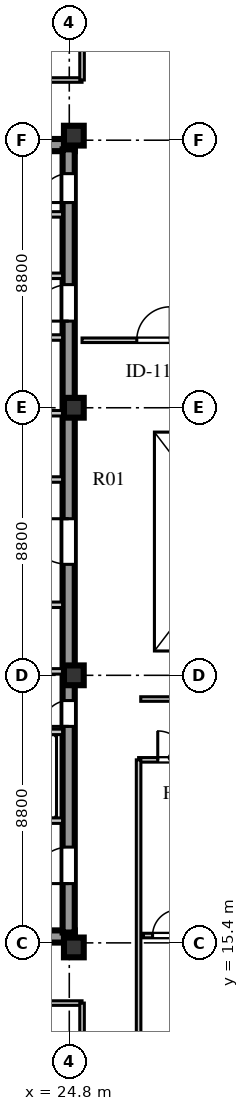
"""IFC4 building model, lengths in metres.
Left out: names, types, materials, properties, quantities, classifications, styles, units other than length and angle.
Written with IfcOpenShell. Run it as: python <this file> out.ifc"""

import sys

from ifc_helpers import new_model, si_unit, direction, frame, frame_2d, origin, origin_2d, place, context, subcontext, project, spatial, rectangle, extrude, element, fill, save


model = new_model("IFC4")
c1 = context("Model", 3, precision=1e-05, world=origin(), true_north=direction((0.0, 1.0)))
c2 = subcontext(c1, "Body", "Model", "MODEL_VIEW")
j1 = project(units=[si_unit("LENGTHUNIT", "METRE"), si_unit("PLANEANGLEUNIT", "RADIAN")], contexts=[c1])
p1 = place(None, origin())
s1 = spatial("IfcSite", under=j1, at=p1, CompositionType="ELEMENT")
p2 = place(p1, origin())
s2 = spatial("IfcBuilding", under=s1, at=p2, CompositionType="ELEMENT")
p3 = place(p2, frame((0.0, 0.0, 320.1)))
s3 = spatial("IfcBuildingStorey", under=s2, at=p3, CompositionType="ELEMENT", Elevation=320.1)
for number, where, z_axis, x_axis in (
    (1, (15.5, 15.61, 0.0), (0.0, 0.0, 1.0), (1.0, 0.0, 0.0)),
    (2, (15.5, 41.64, 0.0), (0.0, 0.0, 1.0), (1.0, 0.0, 0.0)),
):
    element("IfcWall", number, at=place(p3, frame(where, z_axis=z_axis, x_axis=x_axis)), inside=s3, PredefinedType="SHEAR", context=c2, shape_type="SweptSolid", body=[
        extrude(rectangle(XDim=9.48, YDim=0.4, at=frame_2d((4.74, 0.0))), origin(), (0.0, 0.0, 1.0), 3.56),
    ])
p4 = place(p3, frame((24.78, 15.74, 0.0), z_axis=(0.0, 0.0, 1.0), x_axis=(0.0, 1.0, 0.0)))
e3 = element("IfcWall", 3, at=p4, inside=s3, PredefinedType="SHEAR", context=c2, shape_type="SweptSolid", body=[
    extrude(rectangle(XDim=25.76, YDim=0.4, at=frame_2d((12.88, 0.0))), origin(), (0.0, 0.0, 1.0), 3.56),
])
p5 = place(p4, frame((1.61, 0.0, 0.0)))
e4 = element("IfcOpeningElement", 4, at=p5, cuts=e3, PredefinedType="OPENING", context=c2, shape_type="SweptSolid", body=[
    extrude(rectangle(XDim=1.2, YDim=2.1, at=frame_2d((0.6, 1.05))), frame((0.0, 0.21, 0.0), z_axis=(0.0, -1.0, 0.0), x_axis=(1.0, 0.0, 0.0)), (0.0, 0.0, 1.0), 0.42),
])
p6 = place(p4, frame((6.78, 0.0, 0.0)))
e5 = element("IfcOpeningElement", 5, at=p6, cuts=e3, PredefinedType="OPENING", context=c2, shape_type="SweptSolid", body=[
    extrude(rectangle(XDim=0.85, YDim=2.06, at=frame_2d((0.425, 1.03))), frame((0.0, 0.21, 0.0), z_axis=(0.0, -1.0, 0.0), x_axis=(1.0, 0.0, 0.0)), (0.0, 0.0, 1.0), 0.42),
])
p7 = place(p4, frame((12.11, 0.0, 0.0)))
e6 = element("IfcOpeningElement", 6, at=p7, cuts=e3, PredefinedType="OPENING", context=c2, shape_type="SweptSolid", body=[
    extrude(rectangle(XDim=1.5, YDim=2.12, at=frame_2d((0.75, 1.06))), frame((0.0, 0.21, 0.0), z_axis=(0.0, -1.0, 0.0), x_axis=(1.0, 0.0, 0.0)), (0.0, 0.0, 1.0), 0.42),
])
p8 = place(p4, frame((20.11, 0.0, 0.0)))
e7 = element("IfcOpeningElement", 7, at=p8, cuts=e3, PredefinedType="OPENING", context=c2, shape_type="SweptSolid", body=[
    extrude(rectangle(XDim=1.2, YDim=2.12, at=frame_2d((0.6, 1.06))), frame((0.0, 0.21, 0.0), z_axis=(0.0, -1.0, 0.0), x_axis=(1.0, 0.0, 0.0)), (0.0, 0.0, 1.0), 0.42),
])
p9 = place(p4, frame((24.01, 0.0, 0.0)))
e8 = element("IfcOpeningElement", 8, at=p9, cuts=e3, PredefinedType="OPENING", context=c2, shape_type="SweptSolid", body=[
    extrude(rectangle(XDim=0.95, YDim=2.1, at=frame_2d((0.475, 1.05))), frame((0.0, 0.21, 0.0), z_axis=(0.0, -1.0, 0.0), x_axis=(1.0, 0.0, 0.0)), (0.0, 0.0, 1.0), 0.42),
])
for number, where, z_axis, x_axis in (
    (9, (24.95, 15.25, 0.0), (0.0, 0.0, 1.0), (1.0, 0.0, 0.0)),
    (10, (24.95, 24.2, 0.0), (0.0, 0.0, 1.0), (1.0, 0.0, 0.0)),
    (11, (24.95, 33.0, 0.0), (0.0, 0.0, 1.0), (1.0, 0.0, 0.0)),
    (12, (24.95, 41.95, 0.0), (0.0, 0.0, 1.0), (1.0, 0.0, 0.0)),
):
    element("IfcColumn", number, at=place(p3, frame(where, z_axis=z_axis, x_axis=x_axis)), inside=s3, PredefinedType="COLUMN", context=c2, shape_type="SweptSolid", body=[
        extrude(rectangle(XDim=0.65, YDim=0.65, at=origin_2d()), origin(), (0.0, 0.0, 1.0), 3.56),
    ])
p10 = place(p3, frame((19.64, 19.42, 0.0), z_axis=(0.0, 0.0, 1.0), x_axis=(1.0, 0.0, 0.0)))
e13 = element("IfcWall", 13, at=p10, inside=s3, PredefinedType="SOLIDWALL", context=c2, shape_type="SweptSolid", body=[
    extrude(rectangle(XDim=4.94, YDim=0.18, at=frame_2d((2.47, 0.0))), origin(), (0.0, 0.0, 1.0), 3.56),
])
p11 = place(p10, frame((0.72, 0.0, 0.0)))
e14 = element("IfcOpeningElement", 14, at=p11, cuts=e13, PredefinedType="OPENING", context=c2, shape_type="SweptSolid", body=[
    extrude(rectangle(XDim=1.1, YDim=2.1, at=frame_2d((0.55, 1.05))), frame((0.0, 0.1, 0.0), z_axis=(0.0, -1.0, 0.0), x_axis=(1.0, 0.0, 0.0)), (0.0, 0.0, 1.0), 0.2),
])
p12 = place(p10, frame((3.02, 0.0, 0.0)))
e15 = element("IfcOpeningElement", 15, at=p12, cuts=e13, PredefinedType="OPENING", context=c2, shape_type="SweptSolid", body=[
    extrude(rectangle(XDim=1.1, YDim=2.1, at=frame_2d((0.55, 1.05))), frame((0.0, 0.1, 0.0), z_axis=(0.0, -1.0, 0.0), x_axis=(1.0, 0.0, 0.0)), (0.0, 0.0, 1.0), 0.2),
])
p13 = place(p3, frame((19.64, 22.34, 0.0), z_axis=(0.0, 0.0, 1.0), x_axis=(1.0, 0.0, 0.0)))
e16 = element("IfcWall", 16, at=p13, inside=s3, PredefinedType="SOLIDWALL", context=c2, shape_type="SweptSolid", body=[
    extrude(rectangle(XDim=4.94, YDim=0.18, at=frame_2d((2.47, 0.0))), origin(), (0.0, 0.0, 1.0), 3.56),
])
p14 = place(p3, frame((15.9, 26.52, 0.0), z_axis=(0.0, 0.0, 1.0), x_axis=(1.0, 0.0, 0.0)))
e17 = element("IfcWall", 17, at=p14, inside=s3, PredefinedType="SOLIDWALL", context=c2, shape_type="SweptSolid", body=[
    extrude(rectangle(XDim=8.68, YDim=0.18, at=frame_2d((4.34, 0.0))), origin(), (0.0, 0.0, 1.0), 3.56),
])
p15 = place(p14, frame((2.5, 0.0, 0.0)))
e18 = element("IfcOpeningElement", 18, at=p15, cuts=e17, PredefinedType="OPENING", context=c2, shape_type="SweptSolid", body=[
    extrude(rectangle(XDim=0.95, YDim=2.1, at=frame_2d((0.475, 1.05))), frame((0.0, 0.1, 0.0), z_axis=(0.0, -1.0, 0.0), x_axis=(1.0, 0.0, 0.0)), (0.0, 0.0, 1.0), 0.2),
])
p16 = place(p14, frame((6.0, 0.0, 0.0)))
e19 = element("IfcOpeningElement", 19, at=p16, cuts=e17, PredefinedType="OPENING", context=c2, shape_type="SweptSolid", body=[
    extrude(rectangle(XDim=0.95, YDim=2.1, at=frame_2d((0.475, 1.05))), frame((0.0, 0.1, 0.0), z_axis=(0.0, -1.0, 0.0), x_axis=(1.0, 0.0, 0.0)), (0.0, 0.0, 1.0), 0.2),
])
p17 = place(p3, frame((15.9, 24.33, 0.0), z_axis=(0.0, 0.0, 1.0), x_axis=(1.0, 0.0, 0.0)))
e20 = element("IfcWall", 20, at=p17, inside=s3, PredefinedType="SOLIDWALL", context=c2, shape_type="SweptSolid", body=[
    extrude(rectangle(XDim=8.68, YDim=0.18, at=frame_2d((4.34, 0.0))), origin(), (0.0, 0.0, 1.0), 2.96),
])
p18 = place(p3, frame((15.9, 30.64, 0.0), z_axis=(0.0, 0.0, 1.0), x_axis=(1.0, 0.0, 0.0)))
e21 = element("IfcWall", 21, at=p18, inside=s3, PredefinedType="SOLIDWALL", context=c2, shape_type="SweptSolid", body=[
    extrude(rectangle(XDim=8.68, YDim=0.18, at=frame_2d((4.34, 0.0))), origin(), (0.0, 0.0, 1.0), 3.56),
])
p19 = place(p18, frame((3.7, 0.0, 0.0)))
e22 = element("IfcOpeningElement", 22, at=p19, cuts=e21, PredefinedType="OPENING", context=c2, shape_type="SweptSolid", body=[
    extrude(rectangle(XDim=0.95, YDim=2.1, at=frame_2d((0.475, 1.05))), frame((0.0, 0.1, 0.0), z_axis=(0.0, -1.0, 0.0), x_axis=(1.0, 0.0, 0.0)), (0.0, 0.0, 1.0), 0.2),
])
p20 = place(p3, frame((15.9, 32.82, 0.0), z_axis=(0.0, 0.0, 1.0), x_axis=(1.0, 0.0, 0.0)))
e23 = element("IfcWall", 23, at=p20, inside=s3, PredefinedType="SOLIDWALL", context=c2, shape_type="SweptSolid", body=[
    extrude(rectangle(XDim=8.68, YDim=0.18, at=frame_2d((4.34, 0.0))), origin(), (0.0, 0.0, 1.0), 2.96),
])
p21 = place(p3, frame((22.02, 35.31, 0.0), z_axis=(0.0, 0.0, 1.0), x_axis=(1.0, 0.0, 0.0)))
e24 = element("IfcWall", 24, at=p21, inside=s3, PredefinedType="SOLIDWALL", context=c2, shape_type="SweptSolid", body=[
    extrude(rectangle(XDim=2.56, YDim=0.18, at=frame_2d((1.28, 0.0))), origin(), (0.0, 0.0, 1.0), 3.56),
])
p22 = place(p21, frame((0.55, 0.0, 0.0)))
e25 = element("IfcOpeningElement", 25, at=p22, cuts=e24, PredefinedType="OPENING", context=c2, shape_type="SweptSolid", body=[
    extrude(rectangle(XDim=1.0, YDim=2.1, at=frame_2d((0.5, 1.05))), frame((0.0, 0.1, 0.0), z_axis=(0.0, -1.0, 0.0), x_axis=(1.0, 0.0, 0.0)), (0.0, 0.0, 1.0), 0.2),
])
p23 = place(p3, frame((19.64, 37.34, 0.0), z_axis=(0.0, 0.0, 1.0), x_axis=(1.0, 0.0, 0.0)))
e26 = element("IfcWall", 26, at=p23, inside=s3, PredefinedType="SOLIDWALL", context=c2, shape_type="SweptSolid", body=[
    extrude(rectangle(XDim=4.94, YDim=0.18, at=frame_2d((2.47, 0.0))), origin(), (0.0, 0.0, 1.0), 3.56),
])
p24 = place(p23, frame((0.45, 0.0, 0.0)))
e27 = element("IfcOpeningElement", 27, at=p24, cuts=e26, PredefinedType="OPENING", context=c2, shape_type="SweptSolid", body=[
    extrude(rectangle(XDim=1.0, YDim=2.1, at=frame_2d((0.5, 1.05))), frame((0.0, 0.1, 0.0), z_axis=(0.0, -1.0, 0.0), x_axis=(1.0, 0.0, 0.0)), (0.0, 0.0, 1.0), 0.2),
])
p25 = place(p23, frame((2.5, 0.0, 0.0)))
e28 = element("IfcOpeningElement", 28, at=p25, cuts=e26, PredefinedType="OPENING", context=c2, shape_type="SweptSolid", body=[
    extrude(rectangle(XDim=1.0, YDim=2.1, at=frame_2d((0.5, 1.05))), frame((0.0, 0.1, 0.0), z_axis=(0.0, -1.0, 0.0), x_axis=(1.0, 0.0, 0.0)), (0.0, 0.0, 1.0), 0.2),
])
p26 = place(p3, frame((19.64, 39.36, 0.0), z_axis=(0.0, 0.0, 1.0), x_axis=(1.0, 0.0, 0.0)))
e29 = element("IfcWall", 29, at=p26, inside=s3, PredefinedType="SOLIDWALL", context=c2, shape_type="SweptSolid", body=[
    extrude(rectangle(XDim=4.94, YDim=0.18, at=frame_2d((2.47, 0.0))), origin(), (0.0, 0.0, 1.0), 3.56),
])
p27 = place(p3, frame((27.08, 21.42, 0.0), z_axis=(0.0, 0.0, 1.0), x_axis=(1.0, 0.0, 0.0)))
e30 = element("IfcWall", 30, at=p27, inside=s3, PredefinedType="PARTITIONING", context=c2, shape_type="SweptSolid", body=[
    extrude(rectangle(XDim=12.07, YDim=0.15, at=frame_2d((6.035, 0.0))), origin(), (0.0, 0.0, 1.0), 3.26),
])
p28 = place(p27, frame((0.63, 0.0, 0.0)))
e31 = element("IfcOpeningElement", 31, at=p28, cuts=e30, PredefinedType="OPENING", context=c2, shape_type="SweptSolid", body=[
    extrude(rectangle(XDim=0.95, YDim=2.1, at=frame_2d((0.475, 1.05))), frame((0.0, 0.085, 0.0), z_axis=(0.0, -1.0, 0.0), x_axis=(1.0, 0.0, 0.0)), (0.0, 0.0, 1.0), 0.17),
])
p29 = place(p3, frame((27.08, 10.38, 0.0), z_axis=(0.0, 0.0, 1.0), x_axis=(0.0, 1.0, 0.0)))
e32 = element("IfcWall", 32, at=p29, inside=s3, PredefinedType="PARTITIONING", context=c2, shape_type="SweptSolid", body=[
    extrude(rectangle(XDim=11.04, YDim=0.15, at=frame_2d((5.52, 0.0))), origin(), (0.0, 0.0, 1.0), 3.56),
])
p30 = place(p3, frame((27.15, 23.42, 0.0), z_axis=(0.0, 0.0, 1.0), x_axis=(1.0, 0.0, 0.0)))
e33 = element("IfcWall", 33, at=p30, inside=s3, PredefinedType="PARTITIONING", context=c2, shape_type="SweptSolid", body=[
    extrude(rectangle(XDim=6.0, YDim=0.15, at=frame_2d((3.0, 0.0))), origin(), (0.0, 0.0, 1.0), 3.56),
])
p31 = place(p3, frame((25.22, 35.22, 0.0), z_axis=(0.0, 0.0, 1.0), x_axis=(1.0, 0.0, 0.0)))
e34 = element("IfcWall", 34, at=p31, inside=s3, PredefinedType="PARTITIONING", context=c2, shape_type="SweptSolid", body=[
    extrude(rectangle(XDim=9.5, YDim=0.15, at=frame_2d((4.75, 0.0))), origin(), (0.0, 0.0, 1.0), 3.56),
])
p32 = place(p31, frame((1.8, 0.0, 0.0)))
e35 = element("IfcOpeningElement", 35, at=p32, cuts=e34, PredefinedType="OPENING", context=c2, shape_type="SweptSolid", body=[
    extrude(rectangle(XDim=1.1, YDim=2.08, at=frame_2d((0.55, 1.04))), frame((0.0, 0.085, 0.0), z_axis=(0.0, -1.0, 0.0), x_axis=(1.0, 0.0, 0.0)), (0.0, 0.0, 1.0), 0.17),
])
p33 = place(p3, frame((13.8, 13.42, 0.0), z_axis=(0.0, 0.0, 1.0), x_axis=(1.0, 0.0, 0.0)))
e36 = element("IfcWall", 36, at=p33, inside=s3, PredefinedType="PARTITIONING", context=c2, shape_type="SweptSolid", body=[
    extrude(rectangle(XDim=11.42, YDim=0.15, at=frame_2d((5.71, 0.0))), origin(), (0.0, 0.0, 1.0), 3.56),
])
p34 = place(p33, frame((3.2, 0.0, 0.0)))
e37 = element("IfcOpeningElement", 37, at=p34, cuts=e36, PredefinedType="OPENING", context=c2, shape_type="SweptSolid", body=[
    extrude(rectangle(XDim=0.95, YDim=2.08, at=frame_2d((0.475, 1.04))), frame((0.0, 0.085, 0.0), z_axis=(0.0, -1.0, 0.0), x_axis=(1.0, 0.0, 0.0)), (0.0, 0.0, 1.0), 0.17),
])
p35 = place(p3, frame((25.22, 10.38, 0.0), z_axis=(0.0, 0.0, 1.0), x_axis=(0.0, 1.0, 0.0)))
e38 = element("IfcWall", 38, at=p35, inside=s3, PredefinedType="PARTITIONING", context=c2, shape_type="SweptSolid", body=[
    extrude(rectangle(XDim=3.04, YDim=0.15, at=frame_2d((1.52, 0.0))), origin(), (0.0, 0.0, 1.0), 3.11),
])
p36 = place(p3, frame((13.8, 43.78, 0.0), z_axis=(0.0, 0.0, 1.0), x_axis=(1.0, 0.0, 0.0)))
e39 = element("IfcWall", 39, at=p36, inside=s3, PredefinedType="PARTITIONING", context=c2, shape_type="SweptSolid", body=[
    extrude(rectangle(XDim=11.42, YDim=0.15, at=frame_2d((5.71, 0.0))), origin(), (0.0, 0.0, 1.0), 3.56),
])
p37 = place(p36, frame((3.2, 0.0, 0.0)))
e40 = element("IfcOpeningElement", 40, at=p37, cuts=e39, PredefinedType="OPENING", context=c2, shape_type="SweptSolid", body=[
    extrude(rectangle(XDim=0.95, YDim=2.08, at=frame_2d((0.475, 1.04))), frame((0.0, 0.085, 0.0), z_axis=(0.0, -1.0, 0.0), x_axis=(1.0, 0.0, 0.0)), (0.0, 0.0, 1.0), 0.17),
])
p38 = place(p3, frame((25.22, 43.78, 0.0), z_axis=(0.0, 0.0, 1.0), x_axis=(0.0, 1.0, 0.0)))
e41 = element("IfcWall", 41, at=p38, inside=s3, PredefinedType="PARTITIONING", context=c2, shape_type="SweptSolid", body=[
    extrude(rectangle(XDim=3.04, YDim=0.15, at=frame_2d((1.52, 0.0))), origin(), (0.0, 0.0, 1.0), 3.11),
])
p39 = place(p3, frame((27.24, 15.641, 0.0), z_axis=(0.0, 0.0, 1.0), x_axis=(1.0, 0.0, 0.0)))
e42 = element("IfcWall", 42, at=p39, inside=s3, PredefinedType="PARTITIONING", context=c2, shape_type="SweptSolid", body=[
    extrude(rectangle(XDim=11.83, YDim=0.15, at=frame_2d((5.915, 0.0))), origin(), (0.0, 0.0, 1.0), 3.56),
])
p40 = place(p39, frame((0.3, 0.0, 0.0)))
e43 = element("IfcOpeningElement", 43, at=p40, cuts=e42, PredefinedType="OPENING", context=c2, shape_type="SweptSolid", body=[
    extrude(rectangle(XDim=0.85, YDim=2.08, at=frame_2d((0.425, 1.04))), frame((0.0, 0.085, 0.0), z_axis=(0.0, -1.0, 0.0), x_axis=(1.0, 0.0, 0.0)), (0.0, 0.0, 1.0), 0.17),
])
p41 = place(p39, frame((4.475, 0.0, 0.0)))
e44 = element("IfcOpeningElement", 44, at=p41, cuts=e42, PredefinedType="OPENING", context=c2, shape_type="SweptSolid", body=[
    extrude(rectangle(XDim=0.85, YDim=2.08, at=frame_2d((0.425, 1.04))), frame((0.0, 0.085, 0.0), z_axis=(0.0, -1.0, 0.0), x_axis=(1.0, 0.0, 0.0)), (0.0, 0.0, 1.0), 0.17),
])
p42 = place(p5, frame((1.2, 0.0, 0.0), z_axis=(0.0, 0.0, 1.0), x_axis=(-1.0, 0.0, 0.0)))
e45 = element("IfcDoor", 45, at=p42, inside=s3, OperationType="SINGLE_SWING_RIGHT", PredefinedType="DOOR", context=c2, shape_type="SweptSolid", body=[
    extrude(rectangle(XDim=1.2, YDim=2.1, at=frame_2d((0.6, 1.05))), frame((0.0, 0.025, 0.0), z_axis=(0.0, -1.0, 0.0), x_axis=(1.0, 0.0, 0.0)), (0.0, 0.0, 1.0), 0.05),
])
fill(e4, e45)
p43 = place(p6, frame((0.85, 0.0, 0.0), z_axis=(0.0, 0.0, 1.0), x_axis=(-1.0, 0.0, 0.0)))
e46 = element("IfcDoor", 46, at=p43, inside=s3, OperationType="SINGLE_SWING_RIGHT", PredefinedType="DOOR", context=c2, shape_type="SweptSolid", body=[
    extrude(rectangle(XDim=0.85, YDim=2.06, at=frame_2d((0.425, 1.03))), frame((0.0, 0.025, 0.0), z_axis=(0.0, -1.0, 0.0), x_axis=(1.0, 0.0, 0.0)), (0.0, 0.0, 1.0), 0.05),
])
fill(e5, e46)
p44 = place(p7, frame((1.5, 0.0, 0.0), z_axis=(0.0, 0.0, 1.0), x_axis=(-1.0, 0.0, 0.0)))
e47 = element("IfcDoor", 47, at=p44, inside=s3, OperationType="SINGLE_SWING_LEFT", PredefinedType="DOOR", context=c2, shape_type="SweptSolid", body=[
    extrude(rectangle(XDim=1.5, YDim=2.12, at=frame_2d((0.75, 1.06))), frame((0.0, 0.025, 0.0), z_axis=(0.0, -1.0, 0.0), x_axis=(1.0, 0.0, 0.0)), (0.0, 0.0, 1.0), 0.05),
])
fill(e6, e47)
p45 = place(p8, frame((1.2, 0.0, 0.0), z_axis=(0.0, 0.0, 1.0), x_axis=(-1.0, 0.0, 0.0)))
e48 = element("IfcDoor", 48, at=p45, inside=s3, OperationType="SINGLE_SWING_RIGHT", PredefinedType="DOOR", context=c2, shape_type="SweptSolid", body=[
    extrude(rectangle(XDim=1.2, YDim=2.12, at=frame_2d((0.6, 1.06))), frame((0.0, 0.025, 0.0), z_axis=(0.0, -1.0, 0.0), x_axis=(1.0, 0.0, 0.0)), (0.0, 0.0, 1.0), 0.05),
])
fill(e7, e48)
p46 = place(p9, frame((0.95, 0.0, 0.0), z_axis=(0.0, 0.0, 1.0), x_axis=(-1.0, 0.0, 0.0)))
e49 = element("IfcDoor", 49, at=p46, inside=s3, OperationType="SINGLE_SWING_RIGHT", PredefinedType="DOOR", context=c2, shape_type="SweptSolid", body=[
    extrude(rectangle(XDim=0.95, YDim=2.1, at=frame_2d((0.475, 1.05))), frame((0.0, 0.025, 0.0), z_axis=(0.0, -1.0, 0.0), x_axis=(1.0, 0.0, 0.0)), (0.0, 0.0, 1.0), 0.05),
])
fill(e8, e49)
p47 = place(p40, frame((0.85, 0.0, 0.0), z_axis=(0.0, 0.0, 1.0), x_axis=(-1.0, 0.0, 0.0)))
e50 = element("IfcDoor", 50, at=p47, inside=s3, OperationType="SINGLE_SWING_LEFT", PredefinedType="DOOR", context=c2, shape_type="SweptSolid", body=[
    extrude(rectangle(XDim=0.85, YDim=2.08, at=frame_2d((0.425, 1.04))), frame((0.0, 0.025, 0.0), z_axis=(0.0, -1.0, 0.0), x_axis=(1.0, 0.0, 0.0)), (0.0, 0.0, 1.0), 0.05),
])
fill(e43, e50)
p48 = place(p28, frame((0.95, 0.0, 0.0), z_axis=(0.0, 0.0, 1.0), x_axis=(-1.0, 0.0, 0.0)))
e51 = element("IfcDoor", 51, at=p48, inside=s3, OperationType="SINGLE_SWING_RIGHT", PredefinedType="DOOR", context=c2, shape_type="SweptSolid", body=[
    extrude(rectangle(XDim=0.95, YDim=2.1, at=frame_2d((0.475, 1.05))), frame((0.0, 0.025, 0.0), z_axis=(0.0, -1.0, 0.0), x_axis=(1.0, 0.0, 0.0)), (0.0, 0.0, 1.0), 0.05),
])
fill(e31, e51)
p49 = place(p32, origin())
e52 = element("IfcDoor", 52, at=p49, inside=s3, OperationType="SINGLE_SWING_RIGHT", PredefinedType="DOOR", context=c2, shape_type="SweptSolid", body=[
    extrude(rectangle(XDim=1.1, YDim=2.08, at=frame_2d((0.55, 1.04))), frame((0.0, 0.025, 0.0), z_axis=(0.0, -1.0, 0.0), x_axis=(1.0, 0.0, 0.0)), (0.0, 0.0, 1.0), 0.05),
])
fill(e35, e52)
save(model, sys.argv[1])
